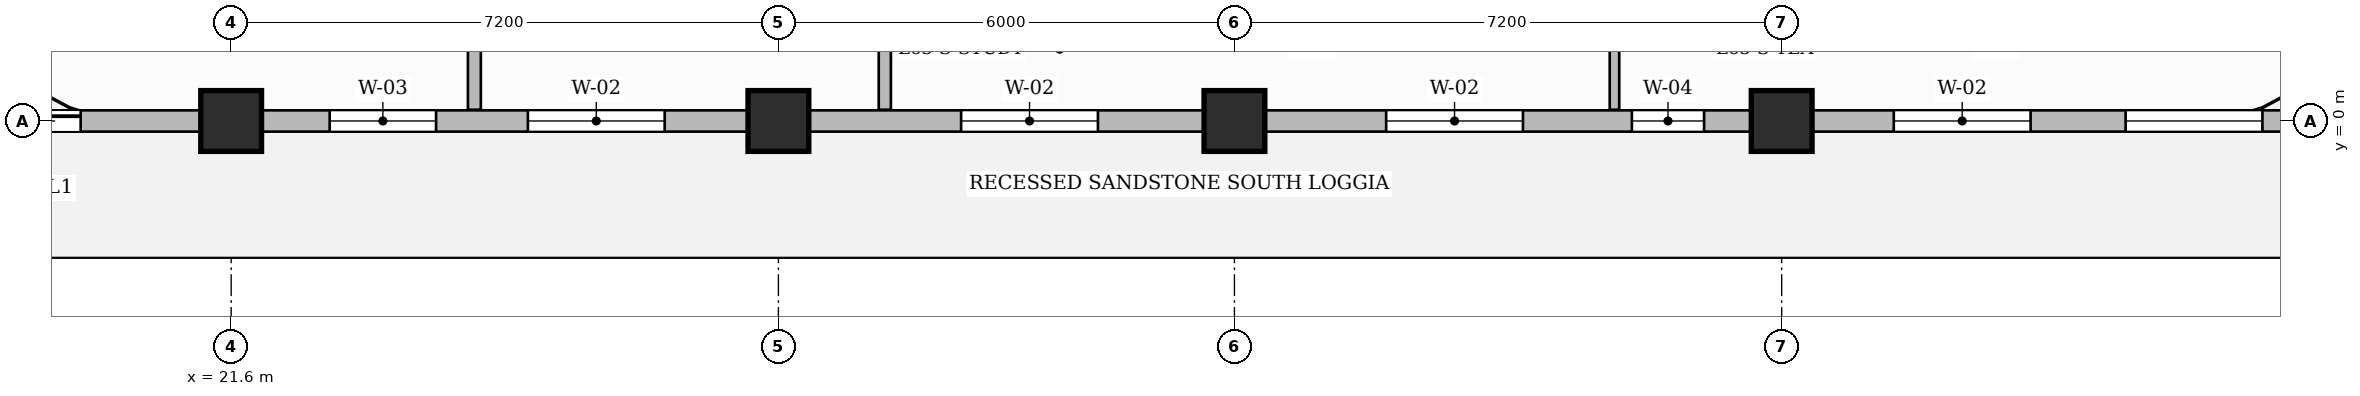
"""IFC4 building model, lengths in metres.
Left out: names, types, materials, properties, quantities, classifications, styles, units other than length and angle.
Written with IfcOpenShell. Run it as: python <this file> out.ifc"""

import sys

from ifc_helpers import new_model, si_unit, direction, frame, frame_2d, origin, origin_2d, place, context, subcontext, project, spatial, rectangle, extrude, source, transform, mapped, element, fill, save


model = new_model("IFC4")
c1 = context("Model", 3, precision=1e-05, world=origin(), true_north=direction((0.0, 1.0)))
c2 = subcontext(c1, "Body", "Model", "MODEL_VIEW")
j1 = project(units=[si_unit("LENGTHUNIT", "METRE"), si_unit("PLANEANGLEUNIT", "RADIAN")], contexts=[c1])
p1 = place(None, origin())
s1 = spatial("IfcSite", under=j1, at=p1, CompositionType="ELEMENT")
p2 = place(p1, origin())
s2 = spatial("IfcBuilding", under=s1, at=p2, CompositionType="ELEMENT")
p3 = place(p2, frame((0.0, 0.0, 259.65)))
s3 = spatial("IfcBuildingStorey", under=s2, at=p3, CompositionType="ELEMENT", Elevation=259.65)
m1 = source(origin(), c2, "Body", "SweptSolid", [
    extrude(rectangle(XDim=0.8, YDim=0.8, at=origin_2d()), origin(), (0.0, 0.0, 1.0), 3.85),
])
for number, where, z_axis, x_axis in (
    (1, (21.6, 0.0, 0.0), (0.0, 0.0, 1.0), (1.0, 0.0, 0.0)),
    (2, (28.8, 0.0, 0.0), (0.0, 0.0, 1.0), (1.0, 0.0, 0.0)),
    (3, (34.8, 0.0, 0.0), (0.0, 0.0, 1.0), (1.0, 0.0, 0.0)),
    (4, (42.0, 0.0, 0.0), (0.0, 0.0, 1.0), (1.0, 0.0, 0.0)),
):
    element("IfcColumn", number, at=place(p3, frame(where, z_axis=z_axis, x_axis=x_axis)), inside=s3, PredefinedType="COLUMN", context=c2, shape_type="MappedRepresentation", body=[
        mapped(m1, transform((0.0, 0.0, 0.0), scale=1.0)),
    ])
p4 = place(p3, frame((30.2, 0.148, 0.0), z_axis=(0.0, 0.0, 1.0), x_axis=(0.0, 1.0, 0.0)))
e5 = element("IfcWall", 5, at=p4, inside=s3, PredefinedType="PARTITIONING", context=c2, shape_type="SweptSolid", body=[
    extrude(rectangle(XDim=9.912, YDim=0.16, at=frame_2d((4.956, 0.0))), origin(), (0.0, 0.0, 1.0), 3.6),
])
p5 = place(p4, frame((1.977, 0.0, 0.0)))
e6 = element("IfcOpeningElement", 6, at=p5, cuts=e5, PredefinedType="OPENING", context=c2, shape_type="SweptSolid", body=[
    extrude(rectangle(XDim=1.05, YDim=2.15, at=frame_2d((0.525, 1.075))), frame((0.0, 0.09, 0.0), z_axis=(0.0, -1.0, 0.0), x_axis=(1.0, 0.0, 0.0)), (0.0, 0.0, 1.0), 0.18),
])
p6 = place(p3, frame((39.8, 0.148, 0.0), z_axis=(0.0, 0.0, 1.0), x_axis=(0.0, 1.0, 0.0)))
e7 = element("IfcWall", 7, at=p6, inside=s3, PredefinedType="PARTITIONING", context=c2, shape_type="SweptSolid", body=[
    extrude(rectangle(XDim=1.562, YDim=0.125, at=frame_2d((0.781, 0.0))), origin(), (0.0, 0.0, 1.0), 3.6),
])
p7 = place(p3, frame((24.8, 0.148, 0.0), z_axis=(0.0, 0.0, 1.0), x_axis=(0.0, 1.0, 0.0)))
e8 = element("IfcWall", 8, at=p7, inside=s3, PredefinedType="PARTITIONING", context=c2, shape_type="SweptSolid", body=[
    extrude(rectangle(XDim=9.912, YDim=0.17, at=frame_2d((4.956, 0.0))), origin(), (0.0, 0.0, 1.0), 3.6),
])
p8 = place(p7, frame((8.452, 0.0, 0.0)))
e9 = element("IfcOpeningElement", 9, at=p8, cuts=e8, PredefinedType="OPENING", context=c2, shape_type="SweptSolid", body=[
    extrude(rectangle(XDim=0.95, YDim=2.15, at=frame_2d((0.475, 1.075))), frame((0.0, 0.095, 0.0), z_axis=(0.0, -1.0, 0.0), x_axis=(1.0, 0.0, 0.0)), (0.0, 0.0, 1.0), 0.19),
])
p9 = place(p3, frame((18.0, 0.0, 0.0), z_axis=(0.0, 0.0, 1.0), x_axis=(1.0, 0.0, 0.0)))
e10 = element("IfcWall", 10, at=p9, inside=s3, PredefinedType="SOLIDWALL", context=c2, shape_type="SweptSolid", body=[
    extrude(rectangle(XDim=31.8, YDim=0.28, at=frame_2d((15.9, 0.0))), origin(), (0.0, 0.0, 1.0), 3.185),
])
p10 = place(p9, frame((0.42, 0.0, 0.0)))
e11 = element("IfcOpeningElement", 11, at=p10, cuts=e10, PredefinedType="OPENING", context=c2, shape_type="SweptSolid", body=[
    extrude(rectangle(XDim=1.2, YDim=2.2, at=frame_2d((0.6, 1.1))), frame((0.0, 0.15, 0.0), z_axis=(0.0, -1.0, 0.0), x_axis=(1.0, 0.0, 0.0)), (0.0, 0.0, 1.0), 0.3),
])
p11 = place(p9, frame((4.896, 0.0, 0.8)))
e12 = element("IfcOpeningElement", 12, at=p11, cuts=e10, PredefinedType="OPENING", context=c2, shape_type="SweptSolid", body=[
    extrude(rectangle(XDim=1.4, YDim=1.85, at=frame_2d((0.7, 0.925))), frame((0.0, 0.15, 0.0), z_axis=(0.0, -1.0, 0.0), x_axis=(1.0, 0.0, 0.0)), (0.0, 0.0, 1.0), 0.3),
])
p12 = place(p9, frame((7.504, 0.0, 0.8)))
e13 = element("IfcOpeningElement", 13, at=p12, cuts=e10, PredefinedType="OPENING", context=c2, shape_type="SweptSolid", body=[
    extrude(rectangle(XDim=1.8, YDim=1.85, at=frame_2d((0.9, 0.925))), frame((0.0, 0.15, 0.0), z_axis=(0.0, -1.0, 0.0), x_axis=(1.0, 0.0, 0.0)), (0.0, 0.0, 1.0), 0.3),
])
p13 = place(p9, frame((13.204, 0.0, 0.8)))
e14 = element("IfcOpeningElement", 14, at=p13, cuts=e10, PredefinedType="OPENING", context=c2, shape_type="SweptSolid", body=[
    extrude(rectangle(XDim=1.8, YDim=1.85, at=frame_2d((0.9, 0.925))), frame((0.0, 0.15, 0.0), z_axis=(0.0, -1.0, 0.0), x_axis=(1.0, 0.0, 0.0)), (0.0, 0.0, 1.0), 0.3),
])
p14 = place(p9, frame((18.796, 0.0, 0.8)))
e15 = element("IfcOpeningElement", 15, at=p14, cuts=e10, PredefinedType="OPENING", context=c2, shape_type="SweptSolid", body=[
    extrude(rectangle(XDim=1.8, YDim=1.85, at=frame_2d((0.9, 0.925))), frame((0.0, 0.15, 0.0), z_axis=(0.0, -1.0, 0.0), x_axis=(1.0, 0.0, 0.0)), (0.0, 0.0, 1.0), 0.3),
])
p15 = place(p9, frame((22.029, 0.0, 0.8)))
e16 = element("IfcOpeningElement", 16, at=p15, cuts=e10, PredefinedType="OPENING", context=c2, shape_type="SweptSolid", body=[
    extrude(rectangle(XDim=0.95, YDim=1.75, at=frame_2d((0.475, 0.875))), frame((0.0, 0.15, 0.0), z_axis=(0.0, -1.0, 0.0), x_axis=(1.0, 0.0, 0.0)), (0.0, 0.0, 1.0), 0.3),
])
p16 = place(p9, frame((25.475, 0.0, 0.8)))
e17 = element("IfcOpeningElement", 17, at=p16, cuts=e10, PredefinedType="OPENING", context=c2, shape_type="SweptSolid", body=[
    extrude(rectangle(XDim=1.8, YDim=1.85, at=frame_2d((0.9, 0.925))), frame((0.0, 0.15, 0.0), z_axis=(0.0, -1.0, 0.0), x_axis=(1.0, 0.0, 0.0)), (0.0, 0.0, 1.0), 0.3),
])
p17 = place(p9, frame((28.525, 0.0, 0.8)))
e18 = element("IfcOpeningElement", 18, at=p17, cuts=e10, PredefinedType="OPENING", context=c2, shape_type="SweptSolid", body=[
    extrude(rectangle(XDim=1.8, YDim=1.85, at=frame_2d((0.9, 0.925))), frame((0.0, 0.15, 0.0), z_axis=(0.0, -1.0, 0.0), x_axis=(1.0, 0.0, 0.0)), (0.0, 0.0, 1.0), 0.3),
])
m2 = source(origin(), c2, "Body", "SweptSolid", [
    extrude(rectangle(XDim=1.2, YDim=2.2, at=frame_2d((0.6, 1.1))), frame((0.0, 0.025, 0.0), z_axis=(0.0, -1.0, 0.0), x_axis=(1.0, 0.0, 0.0)), (0.0, 0.0, 1.0), 0.05),
])
p18 = place(p10, origin())
e19 = element("IfcDoor", 19, at=p18, inside=s3, OperationType="SLIDING_TO_LEFT", PredefinedType="DOOR", context=c2, shape_type="MappedRepresentation", body=[
    mapped(m2, transform((0.0, 0.0, 0.0), scale=1.0)),
])
fill(e11, e19)
m3 = source(origin(), c2, "Body", "SweptSolid", [
    extrude(rectangle(XDim=1.4, YDim=1.85, at=frame_2d((0.7, 0.925))), frame((0.0, 0.03, 0.0), z_axis=(0.0, -1.0, 0.0), x_axis=(1.0, 0.0, 0.0)), (0.0, 0.0, 1.0), 0.06),
])
p19 = place(p11, origin())
e20 = element("IfcWindow", 20, at=p19, inside=s3, PartitioningType="SINGLE_PANEL", PredefinedType="WINDOW", context=c2, shape_type="MappedRepresentation", body=[
    mapped(m3, transform((0.0, 0.0, 0.0), scale=1.0)),
])
fill(e12, e20)
m4 = source(origin(), c2, "Body", "SweptSolid", [
    extrude(rectangle(XDim=1.8, YDim=1.85, at=frame_2d((0.9, 0.925))), frame((0.0, 0.03, 0.0), z_axis=(0.0, -1.0, 0.0), x_axis=(1.0, 0.0, 0.0)), (0.0, 0.0, 1.0), 0.06),
])
p20 = place(p12, origin())
e21 = element("IfcWindow", 21, at=p20, inside=s3, PartitioningType="DOUBLE_PANEL_VERTICAL", PredefinedType="WINDOW", context=c2, shape_type="MappedRepresentation", body=[
    mapped(m4, transform((0.0, 0.0, 0.0), scale=1.0)),
])
fill(e13, e21)
p21 = place(p13, origin())
e22 = element("IfcWindow", 22, at=p21, inside=s3, PartitioningType="DOUBLE_PANEL_VERTICAL", PredefinedType="WINDOW", context=c2, shape_type="MappedRepresentation", body=[
    mapped(m4, transform((0.0, 0.0, 0.0), scale=1.0)),
])
fill(e14, e22)
p22 = place(p14, origin())
e23 = element("IfcWindow", 23, at=p22, inside=s3, PartitioningType="DOUBLE_PANEL_VERTICAL", PredefinedType="WINDOW", context=c2, shape_type="MappedRepresentation", body=[
    mapped(m4, transform((0.0, 0.0, 0.0), scale=1.0)),
])
fill(e15, e23)
m5 = source(origin(), c2, "Body", "SweptSolid", [
    extrude(rectangle(XDim=0.95, YDim=1.75, at=frame_2d((0.475, 0.875))), frame((0.0, 0.03, 0.0), z_axis=(0.0, -1.0, 0.0), x_axis=(1.0, 0.0, 0.0)), (0.0, 0.0, 1.0), 0.06),
])
p23 = place(p15, origin())
e24 = element("IfcWindow", 24, at=p23, inside=s3, PartitioningType="SINGLE_PANEL", PredefinedType="WINDOW", context=c2, shape_type="MappedRepresentation", body=[
    mapped(m5, transform((0.0, 0.0, 0.0), scale=1.0)),
])
fill(e16, e24)
p24 = place(p16, origin())
e25 = element("IfcWindow", 25, at=p24, inside=s3, PartitioningType="DOUBLE_PANEL_VERTICAL", PredefinedType="WINDOW", context=c2, shape_type="MappedRepresentation", body=[
    mapped(m4, transform((0.0, 0.0, 0.0), scale=1.0)),
])
fill(e17, e25)
p25 = place(p17, origin())
e26 = element("IfcWindow", 26, at=p25, inside=s3, PartitioningType="DOUBLE_PANEL_VERTICAL", PredefinedType="WINDOW", context=c2, shape_type="MappedRepresentation", body=[
    mapped(m4, transform((0.0, 0.0, 0.0), scale=1.0)),
])
fill(e18, e26)
save(model, sys.argv[1])
